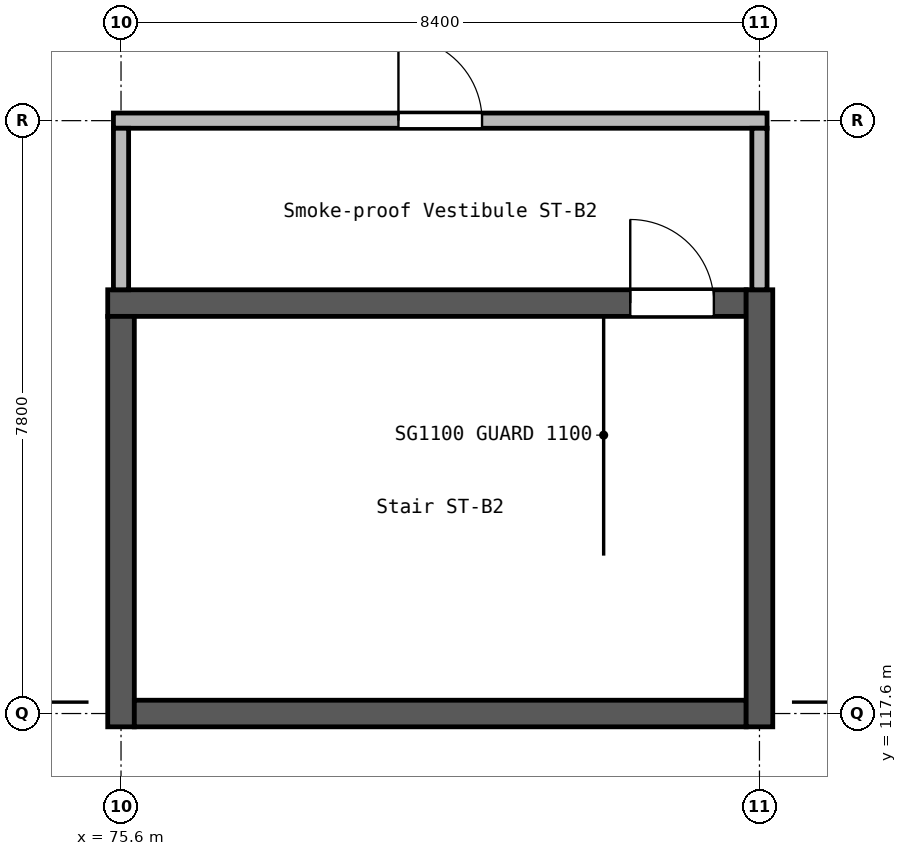
"""IFC4 building model, lengths in metres.
Left out: names, types, materials, properties, quantities, classifications, styles, units other than length and angle.
Written with IfcOpenShell. Run it as: python <this file> out.ifc"""

import sys

from ifc_helpers import new_model, si_unit, direction, frame, frame_2d, origin, place, context, subcontext, project, spatial, rectangle, extrude, element, fill, save


model = new_model("IFC4")
c1 = context("Model", 3, precision=1e-05, world=origin(), true_north=direction((0.0, 1.0)))
c2 = subcontext(c1, "Body", "Model", "MODEL_VIEW")
j1 = project(units=[si_unit("LENGTHUNIT", "METRE"), si_unit("PLANEANGLEUNIT", "RADIAN")], contexts=[c1])
p1 = place(None, origin())
s1 = spatial("IfcSite", under=j1, at=p1, CompositionType="ELEMENT")
p2 = place(p1, origin())
s2 = spatial("IfcBuilding", under=s1, at=p2, CompositionType="ELEMENT")
p3 = place(p2, frame((0.0, 0.0, 28.8)))
s3 = spatial("IfcBuildingStorey", under=s2, at=p3, CompositionType="ELEMENT", Elevation=28.8)
p4 = place(p3, frame((75.425, 123.0, 0.0), z_axis=(0.0, 0.0, 1.0), x_axis=(1.0, 0.0, 0.0)))
e1 = element("IfcWall", 1, at=p4, inside=s3, PredefinedType="SHEAR", context=c2, shape_type="SweptSolid", body=[
    extrude(rectangle(XDim=8.4, YDim=0.35, at=frame_2d((4.2, 0.0))), origin(), (0.0, 0.0, 1.0), 3.7),
])
p5 = place(p4, frame((6.875, 0.0, 0.0)))
e2 = element("IfcOpeningElement", 2, at=p5, cuts=e1, PredefinedType="OPENING", context=c2, shape_type="SweptSolid", body=[
    extrude(rectangle(XDim=1.1, YDim=2.1, at=frame_2d((0.55, 1.05))), frame((0.0, 0.185, 0.0), z_axis=(0.0, -1.0, 0.0), x_axis=(1.0, 0.0, 0.0)), (0.0, 0.0, 1.0), 0.37),
])
p6 = place(p3, frame((75.6, 117.425, 0.0), z_axis=(0.0, 0.0, 1.0), x_axis=(0.0, 1.0, 0.0)))
e3 = element("IfcWall", 3, at=p6, inside=s3, PredefinedType="SHEAR", context=c2, shape_type="SweptSolid", body=[
    extrude(rectangle(XDim=5.4, YDim=0.35, at=frame_2d((2.7, 0.0))), origin(), (0.0, 0.0, 1.0), 3.7),
])
p7 = place(p3, frame((75.775, 117.6, 0.0), z_axis=(0.0, 0.0, 1.0), x_axis=(1.0, 0.0, 0.0)))
e4 = element("IfcWall", 4, at=p7, inside=s3, PredefinedType="SHEAR", context=c2, shape_type="SweptSolid", body=[
    extrude(rectangle(XDim=8.05, YDim=0.35, at=frame_2d((4.025, 0.0))), origin(), (0.0, 0.0, 1.0), 3.7),
])
p8 = place(p3, frame((84.0, 117.425, 0.0), z_axis=(0.0, 0.0, 1.0), x_axis=(0.0, 1.0, 0.0)))
e5 = element("IfcWall", 5, at=p8, inside=s3, PredefinedType="SHEAR", context=c2, shape_type="SweptSolid", body=[
    extrude(rectangle(XDim=5.75, YDim=0.35, at=frame_2d((2.875, 0.0))), origin(), (0.0, 0.0, 1.0), 3.7),
])
p9 = place(p3, frame((75.5, 125.4, 0.0), z_axis=(0.0, 0.0, 1.0), x_axis=(1.0, 0.0, 0.0)))
e6 = element("IfcWall", 6, at=p9, inside=s3, PredefinedType="SOLIDWALL", context=c2, shape_type="SweptSolid", body=[
    extrude(rectangle(XDim=8.6, YDim=0.2, at=frame_2d((4.3, 0.0))), origin(), (0.0, 0.0, 1.0), 3.6),
])
p10 = place(p9, frame((3.75, 0.0, 0.0)))
e7 = element("IfcOpeningElement", 7, at=p10, cuts=e6, PredefinedType="OPENING", context=c2, shape_type="SweptSolid", body=[
    extrude(rectangle(XDim=1.1, YDim=2.1, at=frame_2d((0.55, 1.05))), frame((0.0, 0.11, 0.0), z_axis=(0.0, -1.0, 0.0), x_axis=(1.0, 0.0, 0.0)), (0.0, 0.0, 1.0), 0.22),
])
for number, where, z_axis, x_axis in (
    (8, (75.6, 123.175, 0.0), (0.0, 0.0, 1.0), (0.0, 1.0, 0.0)),
    (9, (84.0, 123.175, 0.0), (0.0, 0.0, 1.0), (0.0, 1.0, 0.0)),
):
    element("IfcWall", number, at=place(p3, frame(where, z_axis=z_axis, x_axis=x_axis)), inside=s3, PredefinedType="SOLIDWALL", context=c2, shape_type="SweptSolid", body=[
        extrude(rectangle(XDim=2.125, YDim=0.2, at=frame_2d((1.062, 0.0))), origin(), (0.0, 0.0, 1.0), 3.6),
    ])
p11 = place(p5, frame((1.1, 0.0, 0.0), z_axis=(0.0, 0.0, 1.0), x_axis=(-1.0, 0.0, 0.0)))
e10 = element("IfcDoor", 10, at=p11, inside=s3, OperationType="SINGLE_SWING_LEFT", PredefinedType="DOOR", context=c2, shape_type="SweptSolid", body=[
    extrude(rectangle(XDim=1.1, YDim=2.1, at=frame_2d((0.55, 1.05))), frame((0.0, 0.025, 0.0), z_axis=(0.0, -1.0, 0.0), x_axis=(1.0, 0.0, 0.0)), (0.0, 0.0, 1.0), 0.05),
])
fill(e2, e10)
p12 = place(p10, frame((1.1, 0.0, 0.0), z_axis=(0.0, 0.0, 1.0), x_axis=(-1.0, 0.0, 0.0)))
e11 = element("IfcDoor", 11, at=p12, inside=s3, OperationType="SINGLE_SWING_LEFT", PredefinedType="DOOR", context=c2, shape_type="SweptSolid", body=[
    extrude(rectangle(XDim=1.1, YDim=2.1, at=frame_2d((0.55, 1.05))), frame((0.0, 0.025, 0.0), z_axis=(0.0, -1.0, 0.0), x_axis=(1.0, 0.0, 0.0)), (0.0, 0.0, 1.0), 0.05),
])
fill(e7, e11)
save(model, sys.argv[1])
